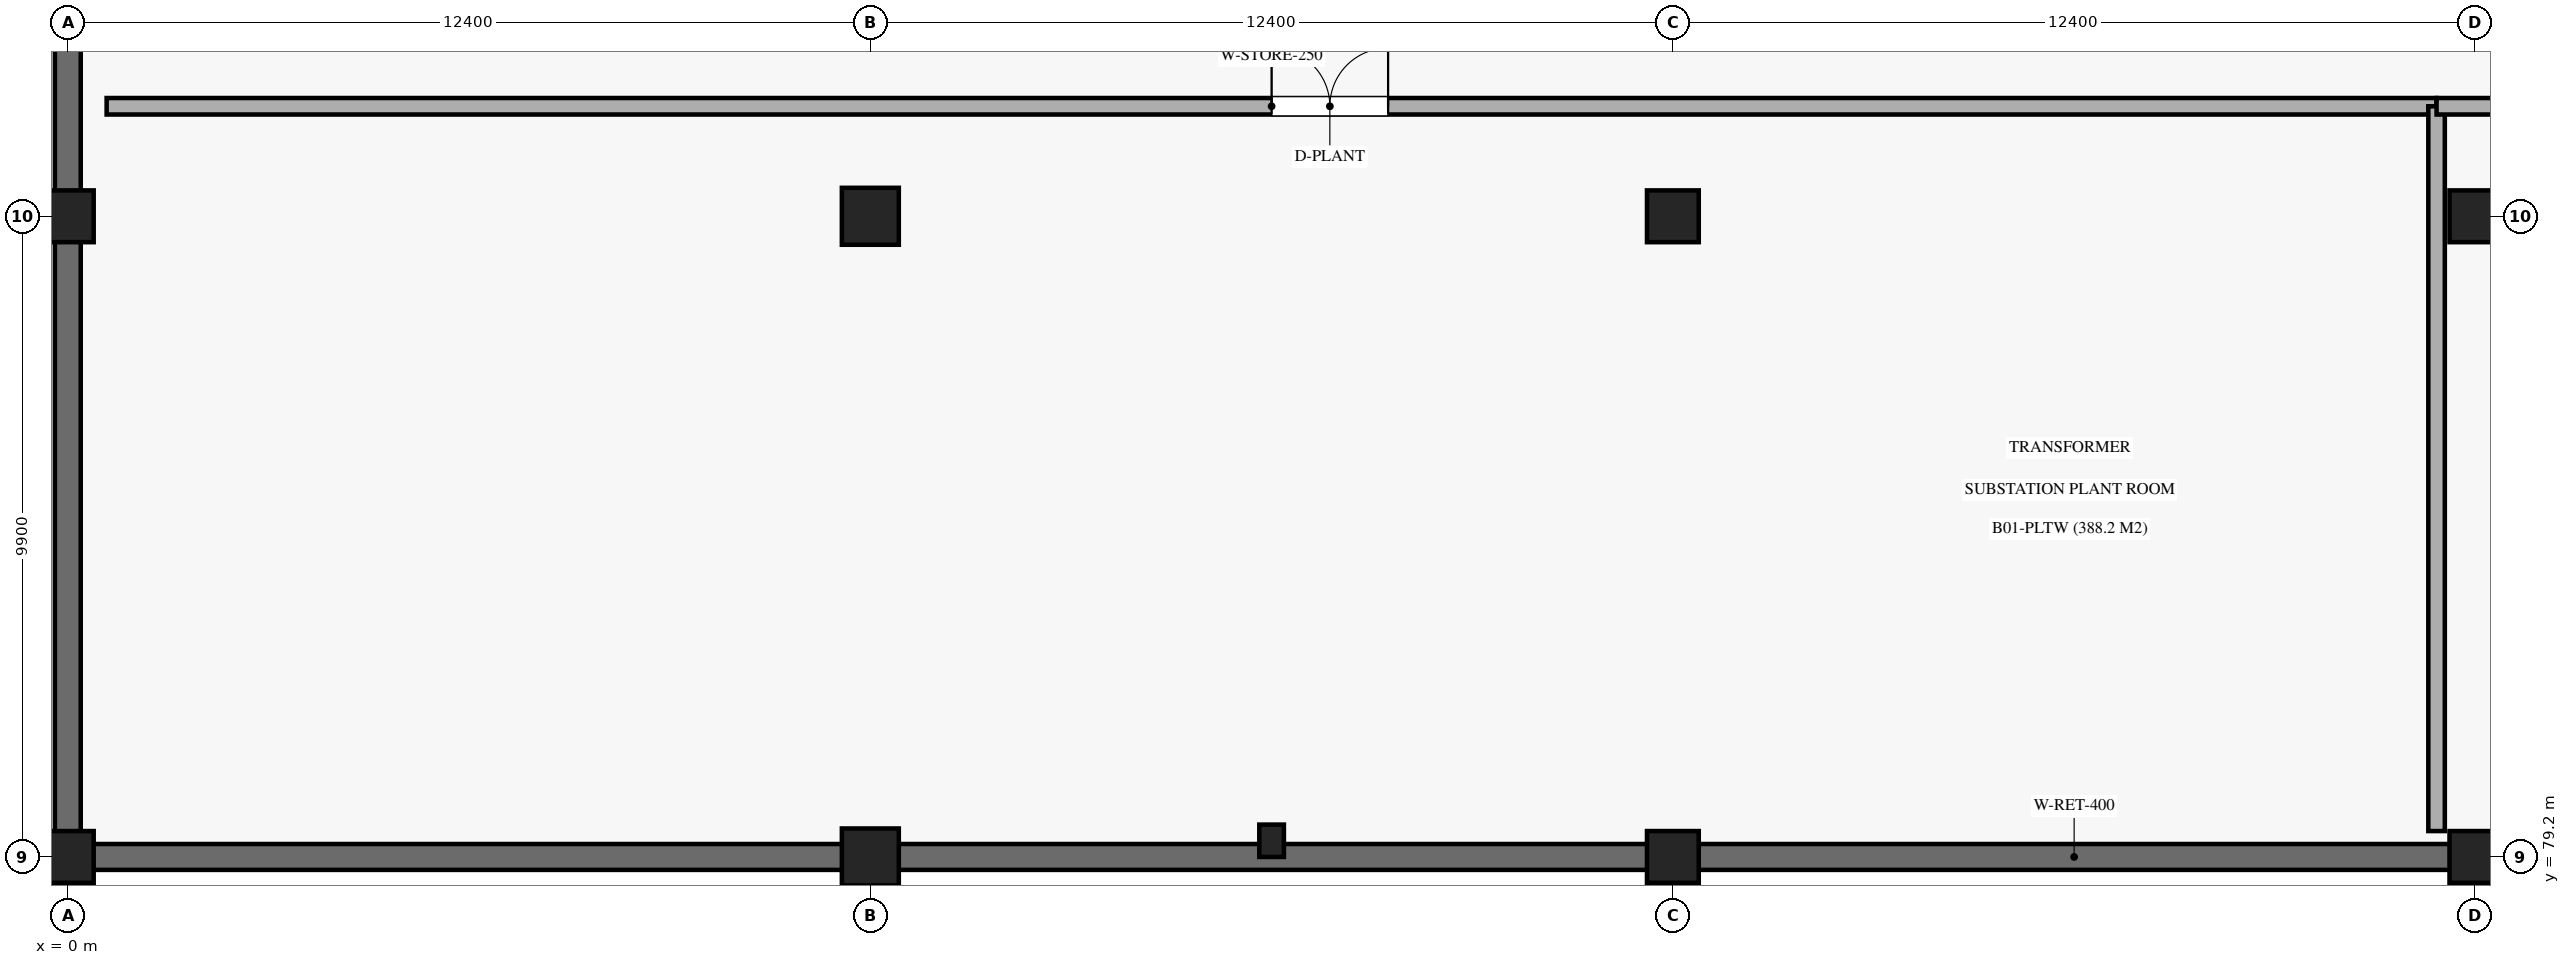
"""IFC4 building model, lengths in metres.
Left out: names, types, materials, properties, quantities, classifications, styles, units other than length and angle.
Written with IfcOpenShell. Run it as: python <this file> out.ifc"""

import sys

from ifc_helpers import new_model, si_unit, direction, frame, frame_2d, origin, origin_2d, place, context, subcontext, project, spatial, rectangle, circle, extrude, element, fill, save


model = new_model("IFC4")
c1 = context("Model", 3, precision=1e-05, world=origin(), true_north=direction((0.0, 1.0)))
c2 = subcontext(c1, "Body", "Model", "MODEL_VIEW")
j1 = project(units=[si_unit("LENGTHUNIT", "METRE"), si_unit("PLANEANGLEUNIT", "RADIAN")], contexts=[c1])
p1 = place(None, origin())
s1 = spatial("IfcSite", under=j1, at=p1, CompositionType="ELEMENT")
p2 = place(p1, origin())
s2 = spatial("IfcBuilding", under=s1, at=p2, CompositionType="ELEMENT")
p3 = place(p2, frame((0.0, 0.0, -4.59)))
s3 = spatial("IfcBuildingStorey", under=s2, at=p3, CompositionType="ELEMENT", Elevation=-4.59)
for number, where, z_axis, x_axis in (
    (1, (0.0, 79.2, 0.0), (0.0, 0.0, 1.0), (1.0, 0.0, 0.0)),
    (2, (0.0, 89.1, 0.0), (0.0, 0.0, 1.0), (1.0, 0.0, 0.0)),
):
    element("IfcColumn", number, at=place(p3, frame(where, z_axis=z_axis, x_axis=x_axis)), inside=s3, PredefinedType="COLUMN", context=c2, shape_type="SweptSolid", body=[
        extrude(rectangle(XDim=0.8, YDim=0.8, at=origin_2d()), origin(), (0.0, 0.0, 1.0), 4.59),
    ])
for number, where, z_axis, x_axis in (
    (3, (12.4, 79.2, 0.0), (0.0, 0.0, 1.0), (1.0, 0.0, 0.0)),
    (4, (12.4, 89.1, 0.0), (0.0, 0.0, 1.0), (1.0, 0.0, 0.0)),
):
    element("IfcColumn", number, at=place(p3, frame(where, z_axis=z_axis, x_axis=x_axis)), inside=s3, PredefinedType="COLUMN", context=c2, shape_type="SweptSolid", body=[
        extrude(circle(Radius=0.44, at=origin_2d()), origin(), (0.0, 0.0, 1.0), 4.59),
    ])
for number, where, z_axis, x_axis in (
    (5, (24.8, 79.2, 0.0), (0.0, 0.0, 1.0), (1.0, 0.0, 0.0)),
    (6, (24.8, 89.1, 0.0), (0.0, 0.0, 1.0), (1.0, 0.0, 0.0)),
    (7, (37.2, 79.2, 0.0), (0.0, 0.0, 1.0), (1.0, 0.0, 0.0)),
    (8, (37.2, 89.1, 0.0), (0.0, 0.0, 1.0), (1.0, 0.0, 0.0)),
):
    element("IfcColumn", number, at=place(p3, frame(where, z_axis=z_axis, x_axis=x_axis)), inside=s3, PredefinedType="COLUMN", context=c2, shape_type="SweptSolid", body=[
        extrude(rectangle(XDim=0.8, YDim=0.8, at=origin_2d()), origin(), (0.0, 0.0, 1.0), 4.59),
    ])
p4 = place(p3, frame((18.6, 79.45, 0.0), z_axis=(0.0, 0.0, 1.0), x_axis=(1.0, 0.0, 0.0)))
e9 = element("IfcColumn", 9, at=p4, inside=s3, PredefinedType="PILASTER", context=c2, shape_type="SweptSolid", body=[
    extrude(rectangle(XDim=0.38, YDim=0.5, at=origin_2d()), origin(), (0.0, 0.0, 1.0), 4.59),
])
p5 = place(p3, frame((0.0, 118.8, 0.0), z_axis=(0.0, 0.0, 1.0), x_axis=(0.0, -1.0, 0.0)))
e10 = element("IfcWall", 10, at=p5, inside=s3, PredefinedType="USERDEFINED", context=c2, shape_type="SweptSolid", body=[
    extrude(rectangle(XDim=39.6, YDim=0.4, at=frame_2d((19.8, 0.0))), origin(), (0.0, 0.0, 1.0), 3.64),
])
p6 = place(p3, frame((0.0, 79.2, 0.0), z_axis=(0.0, 0.0, 1.0), x_axis=(1.0, 0.0, 0.0)))
e11 = element("IfcWall", 11, at=p6, inside=s3, PredefinedType="USERDEFINED", context=c2, shape_type="SweptSolid", body=[
    extrude(rectangle(XDim=62.0, YDim=0.4, at=frame_2d((31.0, 0.0))), origin(), (0.0, 0.0, 1.0), 3.64),
])
p7 = place(p3, frame((0.6, 90.8, 0.0), z_axis=(0.0, 0.0, 1.0), x_axis=(1.0, 0.0, 0.0)))
e12 = element("IfcWall", 12, at=p7, inside=s3, PredefinedType="SOLIDWALL", context=c2, shape_type="SweptSolid", body=[
    extrude(rectangle(XDim=36.0, YDim=0.255, at=frame_2d((18.0, 0.0))), origin(), (0.0, 0.0, 1.0), 3.41),
])
p8 = place(p7, frame((18.0, 0.0, 0.0)))
e13 = element("IfcOpeningElement", 13, at=p8, cuts=e12, PredefinedType="OPENING", context=c2, shape_type="SweptSolid", body=[
    extrude(rectangle(XDim=1.8, YDim=2.25, at=frame_2d((0.9, 1.125))), frame((0.0, 0.137, 0.0), z_axis=(0.0, -1.0, 0.0), x_axis=(1.0, 0.0, 0.0)), (0.0, 0.0, 1.0), 0.275),
])
p9 = place(p3, frame((36.6, 79.6, 0.0), z_axis=(0.0, 0.0, 1.0), x_axis=(0.0, 1.0, 0.0)))
e14 = element("IfcWall", 14, at=p9, inside=s3, PredefinedType="SOLIDWALL", context=c2, shape_type="SweptSolid", body=[
    extrude(rectangle(XDim=11.2, YDim=0.255, at=frame_2d((5.6, 0.0))), origin(), (0.0, 0.0, 1.0), 3.41),
])
p10 = place(p3, frame((36.6, 90.8, 0.0), z_axis=(0.0, 0.0, 1.0), x_axis=(1.0, 0.0, 0.0)))
e15 = element("IfcWall", 15, at=p10, inside=s3, PredefinedType="SOLIDWALL", context=c2, shape_type="SweptSolid", body=[
    extrude(rectangle(XDim=25.0, YDim=0.255, at=frame_2d((12.5, 0.0))), origin(), (0.0, 0.0, 1.0), 3.41),
])
p11 = place(p10, frame((7.5, 0.0, 0.0)))
e16 = element("IfcOpeningElement", 16, at=p11, cuts=e15, PredefinedType="OPENING", context=c2, shape_type="SweptSolid", body=[
    extrude(rectangle(XDim=2.0, YDim=2.4, at=frame_2d((1.0, 1.2))), frame((0.0, 0.137, 0.0), z_axis=(0.0, -1.0, 0.0), x_axis=(1.0, 0.0, 0.0)), (0.0, 0.0, 1.0), 0.275),
])
p12 = place(p8, origin())
e17 = element("IfcDoor", 17, at=p12, inside=s3, OperationType="DOUBLE_DOOR_SINGLE_SWING", PredefinedType="DOOR", context=c2, shape_type="SweptSolid", body=[
    extrude(rectangle(XDim=1.8, YDim=2.25, at=frame_2d((0.9, 1.125))), frame((0.0, 0.025, 0.0), z_axis=(0.0, -1.0, 0.0), x_axis=(1.0, 0.0, 0.0)), (0.0, 0.0, 1.0), 0.05),
])
fill(e13, e17)
save(model, sys.argv[1])
